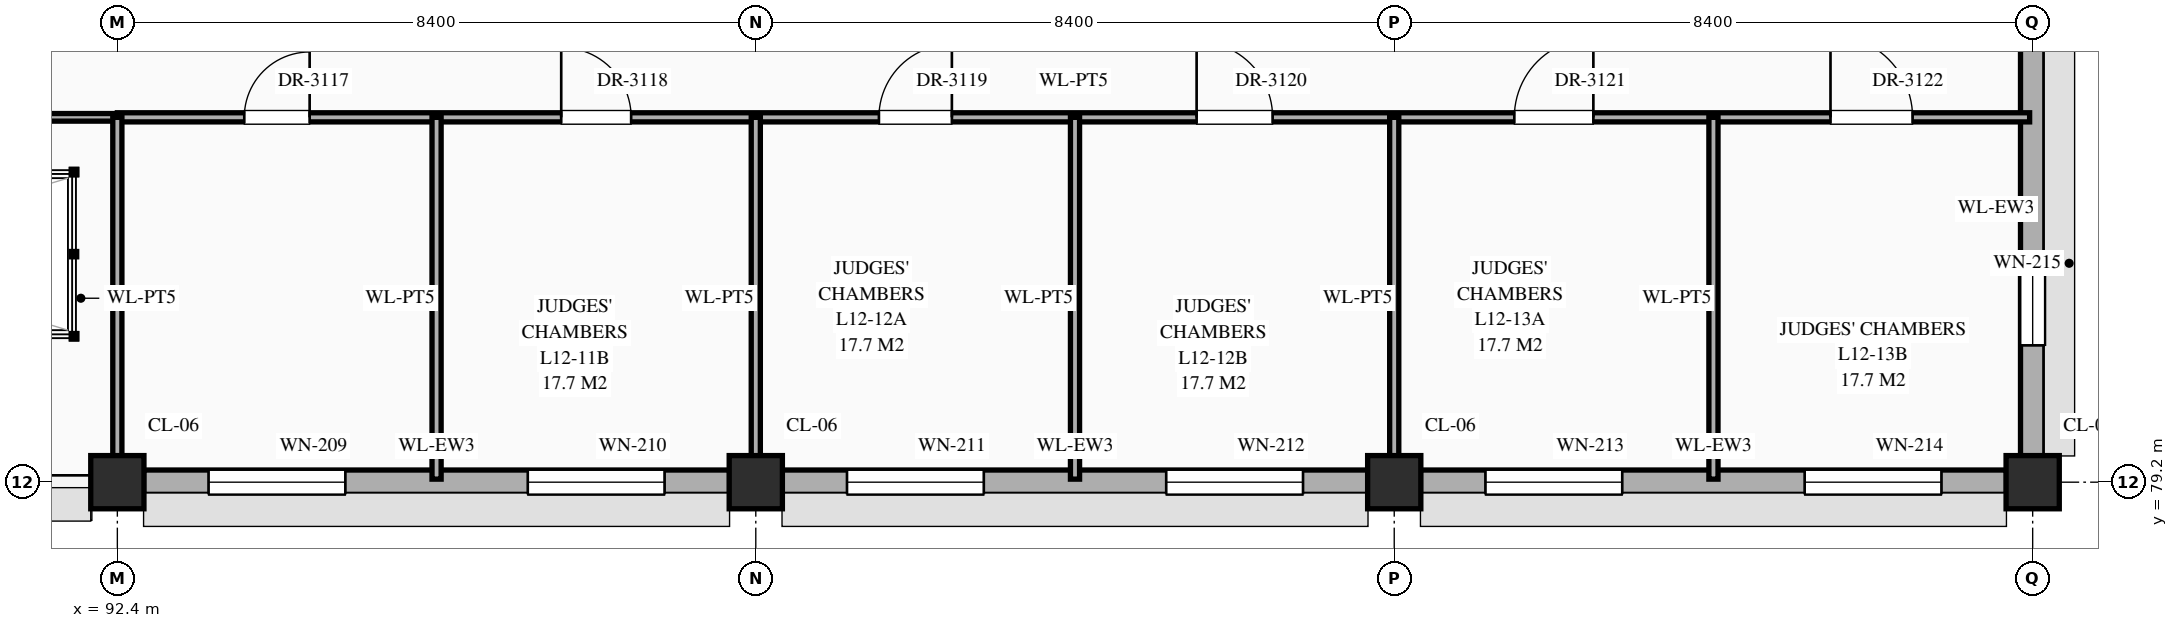
"""IFC4 building model, lengths in metres.
Left out: names, types, materials, properties, quantities, classifications, styles, units other than length and angle.
Written with IfcOpenShell. Run it as: python <this file> out.ifc"""

import sys

from ifc_helpers import new_model, si_unit, direction, frame, frame_2d, origin, origin_2d, place, context, subcontext, project, spatial, rectangle, extrude, element, fill, save


model = new_model("IFC4")
c1 = context("Model", 3, precision=1e-05, world=origin(), true_north=direction((0.0, 1.0)))
c2 = subcontext(c1, "Body", "Model", "MODEL_VIEW")
j1 = project(units=[si_unit("LENGTHUNIT", "METRE"), si_unit("PLANEANGLEUNIT", "RADIAN")], contexts=[c1])
p1 = place(None, origin())
s1 = spatial("IfcSite", under=j1, at=p1, CompositionType="ELEMENT")
p2 = place(p1, origin())
s2 = spatial("IfcBuilding", under=s1, at=p2, CompositionType="ELEMENT")
p3 = place(p2, frame((0.0, 0.0, 51.9)))
s3 = spatial("IfcBuildingStorey", under=s2, at=p3, CompositionType="ELEMENT", Elevation=51.9)
for number, where, z_axis, x_axis in (
    (1, (92.4, 79.2, 0.0), (0.0, 0.0, 1.0), (1.0, 0.0, 0.0)),
    (2, (100.8, 79.2, 0.0), (0.0, 0.0, 1.0), (1.0, 0.0, 0.0)),
    (3, (109.2, 79.2, 0.0), (0.0, 0.0, 1.0), (1.0, 0.0, 0.0)),
    (4, (117.6, 79.2, 0.0), (0.0, 0.0, 1.0), (1.0, 0.0, 0.0)),
):
    element("IfcColumn", number, at=place(p3, frame(where, z_axis=z_axis, x_axis=x_axis)), inside=s3, PredefinedType="COLUMN", context=c2, shape_type="SweptSolid", body=[
        extrude(rectangle(XDim=0.7, YDim=0.7, at=origin_2d()), origin(), (0.0, 0.0, 1.0), 4.2),
    ])
p4 = place(p3, frame((92.745, 79.2, 0.0), z_axis=(0.0, 0.0, 1.0), x_axis=(1.0, 0.0, 0.0)))
e5 = element("IfcWall", 5, at=p4, inside=s3, PredefinedType="STANDARD", context=c2, shape_type="SweptSolid", body=[
    extrude(rectangle(XDim=7.71, YDim=0.32, at=frame_2d((3.855, 0.0))), origin(), (0.0, 0.0, 1.0), 3.31),
])
p5 = place(p4, frame((0.855, 0.0, 0.55)))
e6 = element("IfcOpeningElement", 6, at=p5, cuts=e5, PredefinedType="OPENING", context=c2, shape_type="SweptSolid", body=[
    extrude(rectangle(XDim=1.8, YDim=2.12, at=frame_2d((0.9, 1.06))), frame((0.0, 0.172, 0.0), z_axis=(0.0, -1.0, 0.0), x_axis=(1.0, 0.0, 0.0)), (0.0, 0.0, 1.0), 0.344),
])
p6 = place(p4, frame((5.055, 0.0, 0.55)))
e7 = element("IfcOpeningElement", 7, at=p6, cuts=e5, PredefinedType="OPENING", context=c2, shape_type="SweptSolid", body=[
    extrude(rectangle(XDim=1.8, YDim=2.12, at=frame_2d((0.9, 1.06))), frame((0.0, 0.172, 0.0), z_axis=(0.0, -1.0, 0.0), x_axis=(1.0, 0.0, 0.0)), (0.0, 0.0, 1.0), 0.344),
])
p7 = place(p3, frame((101.145, 79.2, 0.0), z_axis=(0.0, 0.0, 1.0), x_axis=(1.0, 0.0, 0.0)))
e8 = element("IfcWall", 8, at=p7, inside=s3, PredefinedType="STANDARD", context=c2, shape_type="SweptSolid", body=[
    extrude(rectangle(XDim=7.71, YDim=0.32, at=frame_2d((3.855, 0.0))), origin(), (0.0, 0.0, 1.0), 3.31),
])
p8 = place(p7, frame((0.855, 0.0, 0.55)))
e9 = element("IfcOpeningElement", 9, at=p8, cuts=e8, PredefinedType="OPENING", context=c2, shape_type="SweptSolid", body=[
    extrude(rectangle(XDim=1.8, YDim=2.12, at=frame_2d((0.9, 1.06))), frame((0.0, 0.172, 0.0), z_axis=(0.0, -1.0, 0.0), x_axis=(1.0, 0.0, 0.0)), (0.0, 0.0, 1.0), 0.344),
])
p9 = place(p7, frame((5.055, 0.0, 0.55)))
e10 = element("IfcOpeningElement", 10, at=p9, cuts=e8, PredefinedType="OPENING", context=c2, shape_type="SweptSolid", body=[
    extrude(rectangle(XDim=1.8, YDim=2.12, at=frame_2d((0.9, 1.06))), frame((0.0, 0.172, 0.0), z_axis=(0.0, -1.0, 0.0), x_axis=(1.0, 0.0, 0.0)), (0.0, 0.0, 1.0), 0.344),
])
p10 = place(p3, frame((109.545, 79.2, 0.0), z_axis=(0.0, 0.0, 1.0), x_axis=(1.0, 0.0, 0.0)))
e11 = element("IfcWall", 11, at=p10, inside=s3, PredefinedType="STANDARD", context=c2, shape_type="SweptSolid", body=[
    extrude(rectangle(XDim=7.71, YDim=0.32, at=frame_2d((3.855, 0.0))), origin(), (0.0, 0.0, 1.0), 3.31),
])
p11 = place(p10, frame((0.855, 0.0, 0.55)))
e12 = element("IfcOpeningElement", 12, at=p11, cuts=e11, PredefinedType="OPENING", context=c2, shape_type="SweptSolid", body=[
    extrude(rectangle(XDim=1.8, YDim=2.12, at=frame_2d((0.9, 1.06))), frame((0.0, 0.172, 0.0), z_axis=(0.0, -1.0, 0.0), x_axis=(1.0, 0.0, 0.0)), (0.0, 0.0, 1.0), 0.344),
])
p12 = place(p10, frame((5.055, 0.0, 0.55)))
e13 = element("IfcOpeningElement", 13, at=p12, cuts=e11, PredefinedType="OPENING", context=c2, shape_type="SweptSolid", body=[
    extrude(rectangle(XDim=1.8, YDim=2.12, at=frame_2d((0.9, 1.06))), frame((0.0, 0.172, 0.0), z_axis=(0.0, -1.0, 0.0), x_axis=(1.0, 0.0, 0.0)), (0.0, 0.0, 1.0), 0.344),
])
p13 = place(p3, frame((117.6, 79.545, 0.0), z_axis=(0.0, 0.0, 1.0), x_axis=(0.0, 1.0, 0.0)))
e14 = element("IfcWall", 14, at=p13, inside=s3, PredefinedType="STANDARD", context=c2, shape_type="SweptSolid", body=[
    extrude(rectangle(XDim=6.51, YDim=0.32, at=frame_2d((3.255, 0.0))), origin(), (0.0, 0.0, 1.0), 3.31),
])
p14 = place(p13, frame((1.455, 0.0, 0.55)))
e15 = element("IfcOpeningElement", 15, at=p14, cuts=e14, PredefinedType="OPENING", context=c2, shape_type="SweptSolid", body=[
    extrude(rectangle(XDim=1.2, YDim=1.38, at=frame_2d((0.6, 0.69))), frame((0.0, 0.172, 0.0), z_axis=(0.0, -1.0, 0.0), x_axis=(1.0, 0.0, 0.0)), (0.0, 0.0, 1.0), 0.344),
])
p15 = place(p3, frame((75.6, 84.0, 0.0), z_axis=(0.0, 0.0, 1.0), x_axis=(1.0, 0.0, 0.0)))
e16 = element("IfcWall", 16, at=p15, inside=s3, PredefinedType="STANDARD", context=c2, shape_type="SweptSolid", body=[
    extrude(rectangle(XDim=16.8, YDim=0.1, at=frame_2d((8.4, 0.0))), origin(), (0.0, 0.0, 1.0), 3.96),
])
p16 = place(p15, frame((3.63, 0.0, 0.0)))
e17 = element("IfcOpeningElement", 17, at=p16, cuts=e16, PredefinedType="OPENING", context=c2, shape_type="SweptSolid", body=[
    extrude(rectangle(XDim=1.14, YDim=2.4, at=frame_2d((0.57, 1.2))), frame((0.0, 0.062, 0.0), z_axis=(0.0, -1.0, 0.0), x_axis=(1.0, 0.0, 0.0)), (0.0, 0.0, 1.0), 0.124),
])
p17 = place(p15, frame((12.15, 0.0, 0.0)))
e18 = element("IfcOpeningElement", 18, at=p17, cuts=e16, PredefinedType="OPENING", context=c2, shape_type="SweptSolid", body=[
    extrude(rectangle(XDim=0.9, YDim=2.15, at=frame_2d((0.45, 1.075))), frame((0.0, 0.062, 0.0), z_axis=(0.0, -1.0, 0.0), x_axis=(1.0, 0.0, 0.0)), (0.0, 0.0, 1.0), 0.124),
])
p18 = place(p3, frame((92.4, 84.0, 0.0), z_axis=(0.0, 0.0, 1.0), x_axis=(1.0, 0.0, 0.0)))
e19 = element("IfcWall", 19, at=p18, inside=s3, PredefinedType="STANDARD", context=c2, shape_type="SweptSolid", body=[
    extrude(rectangle(XDim=25.16, YDim=0.12, at=frame_2d((12.58, 0.0))), origin(), (0.0, 0.0, 1.0), 3.96),
])
p19 = place(p18, frame((1.67, 0.0, 0.0)))
e20 = element("IfcOpeningElement", 20, at=p19, cuts=e19, PredefinedType="OPENING", context=c2, shape_type="SweptSolid", body=[
    extrude(rectangle(XDim=0.86, YDim=2.1, at=frame_2d((0.43, 1.05))), frame((0.0, 0.072, 0.0), z_axis=(0.0, -1.0, 0.0), x_axis=(1.0, 0.0, 0.0)), (0.0, 0.0, 1.0), 0.144),
])
p20 = place(p18, frame((5.84, 0.0, 0.0)))
e21 = element("IfcOpeningElement", 21, at=p20, cuts=e19, PredefinedType="OPENING", context=c2, shape_type="SweptSolid", body=[
    extrude(rectangle(XDim=0.92, YDim=2.15, at=frame_2d((0.46, 1.075))), frame((0.0, 0.072, 0.0), z_axis=(0.0, -1.0, 0.0), x_axis=(1.0, 0.0, 0.0)), (0.0, 0.0, 1.0), 0.144),
])
p21 = place(p18, frame((10.02, 0.0, 0.0)))
e22 = element("IfcOpeningElement", 22, at=p21, cuts=e19, PredefinedType="OPENING", context=c2, shape_type="SweptSolid", body=[
    extrude(rectangle(XDim=0.96, YDim=2.2, at=frame_2d((0.48, 1.1))), frame((0.0, 0.072, 0.0), z_axis=(0.0, -1.0, 0.0), x_axis=(1.0, 0.0, 0.0)), (0.0, 0.0, 1.0), 0.144),
])
p22 = place(p18, frame((14.2, 0.0, 0.0)))
e23 = element("IfcOpeningElement", 23, at=p22, cuts=e19, PredefinedType="OPENING", context=c2, shape_type="SweptSolid", body=[
    extrude(rectangle(XDim=1.0, YDim=2.25, at=frame_2d((0.5, 1.125))), frame((0.0, 0.072, 0.0), z_axis=(0.0, -1.0, 0.0), x_axis=(1.0, 0.0, 0.0)), (0.0, 0.0, 1.0), 0.144),
])
p23 = place(p18, frame((18.38, 0.0, 0.0)))
e24 = element("IfcOpeningElement", 24, at=p23, cuts=e19, PredefinedType="OPENING", context=c2, shape_type="SweptSolid", body=[
    extrude(rectangle(XDim=1.04, YDim=2.2, at=frame_2d((0.52, 1.1))), frame((0.0, 0.072, 0.0), z_axis=(0.0, -1.0, 0.0), x_axis=(1.0, 0.0, 0.0)), (0.0, 0.0, 1.0), 0.144),
])
p24 = place(p18, frame((22.54, 0.0, 0.0)))
e25 = element("IfcOpeningElement", 25, at=p24, cuts=e19, PredefinedType="OPENING", context=c2, shape_type="SweptSolid", body=[
    extrude(rectangle(XDim=1.08, YDim=2.25, at=frame_2d((0.54, 1.125))), frame((0.0, 0.072, 0.0), z_axis=(0.0, -1.0, 0.0), x_axis=(1.0, 0.0, 0.0)), (0.0, 0.0, 1.0), 0.144),
])
p25 = place(p3, frame((92.4, 79.24, 0.0), z_axis=(0.0, 0.0, 1.0), x_axis=(0.0, 1.0, 0.0)))
e26 = element("IfcWall", 26, at=p25, inside=s3, PredefinedType="STANDARD", context=c2, shape_type="SweptSolid", body=[
    extrude(rectangle(XDim=4.76, YDim=0.12, at=frame_2d((2.38, 0.0))), origin(), (0.0, 0.0, 1.0), 3.21),
])
p26 = place(p3, frame((96.6, 79.24, 0.0), z_axis=(0.0, 0.0, 1.0), x_axis=(0.0, 1.0, 0.0)))
e27 = element("IfcWall", 27, at=p26, inside=s3, PredefinedType="STANDARD", context=c2, shape_type="SweptSolid", body=[
    extrude(rectangle(XDim=4.76, YDim=0.12, at=frame_2d((2.38, 0.0))), origin(), (0.0, 0.0, 1.0), 3.61),
])
p27 = place(p3, frame((100.8, 79.24, 0.0), z_axis=(0.0, 0.0, 1.0), x_axis=(0.0, 1.0, 0.0)))
e28 = element("IfcWall", 28, at=p27, inside=s3, PredefinedType="STANDARD", context=c2, shape_type="SweptSolid", body=[
    extrude(rectangle(XDim=4.76, YDim=0.12, at=frame_2d((2.38, 0.0))), origin(), (0.0, 0.0, 1.0), 3.21),
])
p28 = place(p3, frame((105.0, 79.24, 0.0), z_axis=(0.0, 0.0, 1.0), x_axis=(0.0, 1.0, 0.0)))
e29 = element("IfcWall", 29, at=p28, inside=s3, PredefinedType="STANDARD", context=c2, shape_type="SweptSolid", body=[
    extrude(rectangle(XDim=4.76, YDim=0.12, at=frame_2d((2.38, 0.0))), origin(), (0.0, 0.0, 1.0), 3.96),
])
p29 = place(p3, frame((109.2, 79.24, 0.0), z_axis=(0.0, 0.0, 1.0), x_axis=(0.0, 1.0, 0.0)))
e30 = element("IfcWall", 30, at=p29, inside=s3, PredefinedType="STANDARD", context=c2, shape_type="SweptSolid", body=[
    extrude(rectangle(XDim=4.76, YDim=0.12, at=frame_2d((2.38, 0.0))), origin(), (0.0, 0.0, 1.0), 3.21),
])
p30 = place(p3, frame((113.4, 79.24, 0.0), z_axis=(0.0, 0.0, 1.0), x_axis=(0.0, 1.0, 0.0)))
e31 = element("IfcWall", 31, at=p30, inside=s3, PredefinedType="STANDARD", context=c2, shape_type="SweptSolid", body=[
    extrude(rectangle(XDim=4.76, YDim=0.12, at=frame_2d((2.38, 0.0))), origin(), (0.0, 0.0, 1.0), 3.61),
])
p31 = place(p5, origin())
e32 = element("IfcWindow", 32, at=p31, inside=s3, PartitioningType="SINGLE_PANEL", PredefinedType="WINDOW", context=c2, shape_type="SweptSolid", body=[
    extrude(rectangle(XDim=1.8, YDim=2.12, at=frame_2d((0.9, 1.06))), frame((0.0, 0.03, 0.0), z_axis=(0.0, -1.0, 0.0), x_axis=(1.0, 0.0, 0.0)), (0.0, 0.0, 1.0), 0.06),
])
fill(e6, e32)
p32 = place(p6, origin())
e33 = element("IfcWindow", 33, at=p32, inside=s3, PartitioningType="SINGLE_PANEL", PredefinedType="WINDOW", context=c2, shape_type="SweptSolid", body=[
    extrude(rectangle(XDim=1.8, YDim=2.12, at=frame_2d((0.9, 1.06))), frame((0.0, 0.03, 0.0), z_axis=(0.0, -1.0, 0.0), x_axis=(1.0, 0.0, 0.0)), (0.0, 0.0, 1.0), 0.06),
])
fill(e7, e33)
p33 = place(p8, origin())
e34 = element("IfcWindow", 34, at=p33, inside=s3, PartitioningType="SINGLE_PANEL", PredefinedType="WINDOW", context=c2, shape_type="SweptSolid", body=[
    extrude(rectangle(XDim=1.8, YDim=2.12, at=frame_2d((0.9, 1.06))), frame((0.0, 0.03, 0.0), z_axis=(0.0, -1.0, 0.0), x_axis=(1.0, 0.0, 0.0)), (0.0, 0.0, 1.0), 0.06),
])
fill(e9, e34)
p34 = place(p9, origin())
e35 = element("IfcWindow", 35, at=p34, inside=s3, PartitioningType="SINGLE_PANEL", PredefinedType="WINDOW", context=c2, shape_type="SweptSolid", body=[
    extrude(rectangle(XDim=1.8, YDim=2.12, at=frame_2d((0.9, 1.06))), frame((0.0, 0.03, 0.0), z_axis=(0.0, -1.0, 0.0), x_axis=(1.0, 0.0, 0.0)), (0.0, 0.0, 1.0), 0.06),
])
fill(e10, e35)
p35 = place(p11, origin())
e36 = element("IfcWindow", 36, at=p35, inside=s3, PartitioningType="SINGLE_PANEL", PredefinedType="WINDOW", context=c2, shape_type="SweptSolid", body=[
    extrude(rectangle(XDim=1.8, YDim=2.12, at=frame_2d((0.9, 1.06))), frame((0.0, 0.03, 0.0), z_axis=(0.0, -1.0, 0.0), x_axis=(1.0, 0.0, 0.0)), (0.0, 0.0, 1.0), 0.06),
])
fill(e12, e36)
p36 = place(p12, origin())
e37 = element("IfcWindow", 37, at=p36, inside=s3, PartitioningType="SINGLE_PANEL", PredefinedType="WINDOW", context=c2, shape_type="SweptSolid", body=[
    extrude(rectangle(XDim=1.8, YDim=2.12, at=frame_2d((0.9, 1.06))), frame((0.0, 0.03, 0.0), z_axis=(0.0, -1.0, 0.0), x_axis=(1.0, 0.0, 0.0)), (0.0, 0.0, 1.0), 0.06),
])
fill(e13, e37)
p37 = place(p14, origin())
e38 = element("IfcWindow", 38, at=p37, inside=s3, PartitioningType="SINGLE_PANEL", PredefinedType="WINDOW", context=c2, shape_type="SweptSolid", body=[
    extrude(rectangle(XDim=1.2, YDim=1.38, at=frame_2d((0.6, 0.69))), frame((0.0, 0.03, 0.0), z_axis=(0.0, -1.0, 0.0), x_axis=(1.0, 0.0, 0.0)), (0.0, 0.0, 1.0), 0.06),
])
fill(e15, e38)
p38 = place(p19, origin())
e39 = element("IfcDoor", 39, at=p38, inside=s3, OperationType="SINGLE_SWING_RIGHT", PredefinedType="DOOR", context=c2, shape_type="SweptSolid", body=[
    extrude(rectangle(XDim=0.86, YDim=2.1, at=frame_2d((0.43, 1.05))), frame((0.0, 0.025, 0.0), z_axis=(0.0, -1.0, 0.0), x_axis=(1.0, 0.0, 0.0)), (0.0, 0.0, 1.0), 0.05),
])
fill(e20, e39)
p39 = place(p20, origin())
e40 = element("IfcDoor", 40, at=p39, inside=s3, OperationType="SINGLE_SWING_LEFT", PredefinedType="DOOR", context=c2, shape_type="SweptSolid", body=[
    extrude(rectangle(XDim=0.92, YDim=2.15, at=frame_2d((0.46, 1.075))), frame((0.0, 0.025, 0.0), z_axis=(0.0, -1.0, 0.0), x_axis=(1.0, 0.0, 0.0)), (0.0, 0.0, 1.0), 0.05),
])
fill(e21, e40)
p40 = place(p21, origin())
e41 = element("IfcDoor", 41, at=p40, inside=s3, OperationType="SINGLE_SWING_RIGHT", PredefinedType="DOOR", context=c2, shape_type="SweptSolid", body=[
    extrude(rectangle(XDim=0.96, YDim=2.2, at=frame_2d((0.48, 1.1))), frame((0.0, 0.025, 0.0), z_axis=(0.0, -1.0, 0.0), x_axis=(1.0, 0.0, 0.0)), (0.0, 0.0, 1.0), 0.05),
])
fill(e22, e41)
p41 = place(p22, origin())
e42 = element("IfcDoor", 42, at=p41, inside=s3, OperationType="SINGLE_SWING_LEFT", PredefinedType="DOOR", context=c2, shape_type="SweptSolid", body=[
    extrude(rectangle(XDim=1.0, YDim=2.25, at=frame_2d((0.5, 1.125))), frame((0.0, 0.025, 0.0), z_axis=(0.0, -1.0, 0.0), x_axis=(1.0, 0.0, 0.0)), (0.0, 0.0, 1.0), 0.05),
])
fill(e23, e42)
p42 = place(p23, origin())
e43 = element("IfcDoor", 43, at=p42, inside=s3, OperationType="SINGLE_SWING_RIGHT", PredefinedType="DOOR", context=c2, shape_type="SweptSolid", body=[
    extrude(rectangle(XDim=1.04, YDim=2.2, at=frame_2d((0.52, 1.1))), frame((0.0, 0.025, 0.0), z_axis=(0.0, -1.0, 0.0), x_axis=(1.0, 0.0, 0.0)), (0.0, 0.0, 1.0), 0.05),
])
fill(e24, e43)
p43 = place(p24, origin())
e44 = element("IfcDoor", 44, at=p43, inside=s3, OperationType="SINGLE_SWING_LEFT", PredefinedType="DOOR", context=c2, shape_type="SweptSolid", body=[
    extrude(rectangle(XDim=1.08, YDim=2.25, at=frame_2d((0.54, 1.125))), frame((0.0, 0.025, 0.0), z_axis=(0.0, -1.0, 0.0), x_axis=(1.0, 0.0, 0.0)), (0.0, 0.0, 1.0), 0.05),
])
fill(e25, e44)
save(model, sys.argv[1])
